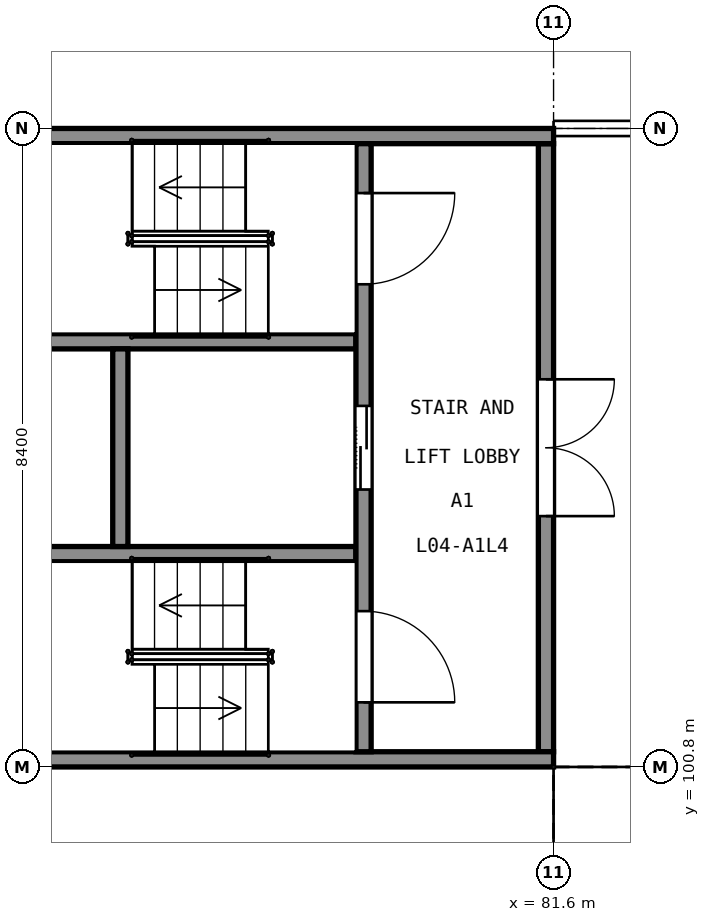
"""IFC4 building model, lengths in metres.
Left out: names, types, materials, properties, quantities, classifications, styles, units other than length and angle.
Written with IfcOpenShell. Run it as: python <this file> out.ifc"""

import sys

from ifc_helpers import new_model, si_unit, direction, frame, frame_2d, origin, place, context, subcontext, project, spatial, rectangle, extrude, element, fill, save


model = new_model("IFC4")
c1 = context("Model", 3, precision=1e-05, world=origin(), true_north=direction((0.0, 1.0)))
c2 = subcontext(c1, "Body", "Model", "MODEL_VIEW")
j1 = project(units=[si_unit("LENGTHUNIT", "METRE"), si_unit("PLANEANGLEUNIT", "RADIAN")], contexts=[c1])
p1 = place(None, origin())
s1 = spatial("IfcSite", under=j1, at=p1, CompositionType="ELEMENT")
p2 = place(p1, origin())
s2 = spatial("IfcBuilding", under=s1, at=p2, CompositionType="ELEMENT")
p3 = place(p2, frame((0.0, 0.0, 25.0)))
s3 = spatial("IfcBuildingStorey", under=s2, at=p3, CompositionType="ELEMENT", Elevation=25.0)
for number, where, z_axis, x_axis in (
    (1, (73.2, 100.9, 0.0), (0.0, 0.0, 1.0), (1.0, 0.0, 0.0)),
    (2, (73.2, 109.1, 0.0), (0.0, 0.0, 1.0), (1.0, 0.0, 0.0)),
):
    element("IfcWall", number, at=place(p3, frame(where, z_axis=z_axis, x_axis=x_axis)), inside=s3, PredefinedType="SHEAR", context=c2, shape_type="SweptSolid", body=[
        extrude(rectangle(XDim=8.4, YDim=0.2, at=frame_2d((4.2, 0.0))), origin(), (0.0, 0.0, 1.0), 5.0),
    ])
p4 = place(p3, frame((81.5, 101.0, 0.0), z_axis=(0.0, 0.0, 1.0), x_axis=(0.0, 1.0, 0.0)))
e3 = element("IfcWall", 3, at=p4, inside=s3, PredefinedType="SHEAR", context=c2, shape_type="SweptSolid", body=[
    extrude(rectangle(XDim=8.0, YDim=0.2, at=frame_2d((4.0, 0.0))), origin(), (0.0, 0.0, 1.0), 5.0),
])
p5 = place(p4, frame((3.1, 0.0, 0.0)))
e4 = element("IfcOpeningElement", 4, at=p5, cuts=e3, PredefinedType="OPENING", context=c2, shape_type="SweptSolid", body=[
    extrude(rectangle(XDim=1.8, YDim=2.1, at=frame_2d((0.9, 1.05))), frame((0.0, 0.11, 0.0), z_axis=(0.0, -1.0, 0.0), x_axis=(1.0, 0.0, 0.0)), (0.0, 0.0, 1.0), 0.22),
])
p6 = place(p3, frame((79.1, 101.0, 0.0), z_axis=(0.0, 0.0, 1.0), x_axis=(0.0, 1.0, 0.0)))
e5 = element("IfcWall", 5, at=p6, inside=s3, PredefinedType="SHEAR", context=c2, shape_type="SweptSolid", body=[
    extrude(rectangle(XDim=8.0, YDim=0.2, at=frame_2d((4.0, 0.0))), origin(), (0.0, 0.0, 1.0), 5.0),
])
p7 = place(p6, frame((0.65, 0.0, 0.0)))
e6 = element("IfcOpeningElement", 6, at=p7, cuts=e5, PredefinedType="OPENING", context=c2, shape_type="SweptSolid", body=[
    extrude(rectangle(XDim=1.2, YDim=2.1, at=frame_2d((0.6, 1.05))), frame((0.0, 0.11, 0.0), z_axis=(0.0, -1.0, 0.0), x_axis=(1.0, 0.0, 0.0)), (0.0, 0.0, 1.0), 0.22),
])
p8 = place(p6, frame((6.15, 0.0, 0.0)))
e7 = element("IfcOpeningElement", 7, at=p8, cuts=e5, PredefinedType="OPENING", context=c2, shape_type="SweptSolid", body=[
    extrude(rectangle(XDim=1.2, YDim=2.1, at=frame_2d((0.6, 1.05))), frame((0.0, 0.11, 0.0), z_axis=(0.0, -1.0, 0.0), x_axis=(1.0, 0.0, 0.0)), (0.0, 0.0, 1.0), 0.22),
])
p9 = place(p6, frame((3.45, 0.0, 0.0)))
e8 = element("IfcOpeningElement", 8, at=p9, cuts=e5, PredefinedType="OPENING", context=c2, shape_type="SweptSolid", body=[
    extrude(rectangle(XDim=1.1, YDim=2.1, at=frame_2d((0.55, 1.05))), frame((0.0, 0.11, 0.0), z_axis=(0.0, -1.0, 0.0), x_axis=(1.0, 0.0, 0.0)), (0.0, 0.0, 1.0), 0.22),
])
for number, where, z_axis, x_axis in (
    (9, (73.4, 103.6, 0.0), (0.0, 0.0, 1.0), (1.0, 0.0, 0.0)),
    (10, (73.4, 106.4, 0.0), (0.0, 0.0, 1.0), (1.0, 0.0, 0.0)),
):
    element("IfcWall", number, at=place(p3, frame(where, z_axis=z_axis, x_axis=x_axis)), inside=s3, PredefinedType="SHEAR", context=c2, shape_type="SweptSolid", body=[
        extrude(rectangle(XDim=5.6, YDim=0.2, at=frame_2d((2.8, 0.0))), origin(), (0.0, 0.0, 1.0), 5.0),
    ])
p10 = place(p3, frame((75.9, 103.7, 0.0), z_axis=(0.0, 0.0, 1.0), x_axis=(0.0, 1.0, 0.0)))
e11 = element("IfcWall", 11, at=p10, inside=s3, PredefinedType="SHEAR", context=c2, shape_type="SweptSolid", body=[
    extrude(rectangle(XDim=2.6, YDim=0.2, at=frame_2d((1.3, 0.0))), origin(), (0.0, 0.0, 1.0), 5.0),
])
p11 = place(p5, origin())
e12 = element("IfcDoor", 12, at=p11, inside=s3, OperationType="DOUBLE_DOOR_SINGLE_SWING", PredefinedType="DOOR", context=c2, shape_type="SweptSolid", body=[
    extrude(rectangle(XDim=1.8, YDim=2.1, at=frame_2d((0.9, 1.05))), frame((0.0, 0.025, 0.0), z_axis=(0.0, -1.0, 0.0), x_axis=(1.0, 0.0, 0.0)), (0.0, 0.0, 1.0), 0.05),
])
fill(e4, e12)
p12 = place(p7, origin())
e13 = element("IfcDoor", 13, at=p12, inside=s3, OperationType="SINGLE_SWING_LEFT", PredefinedType="DOOR", context=c2, shape_type="SweptSolid", body=[
    extrude(rectangle(XDim=1.2, YDim=2.1, at=frame_2d((0.6, 1.05))), frame((0.0, 0.025, 0.0), z_axis=(0.0, -1.0, 0.0), x_axis=(1.0, 0.0, 0.0)), (0.0, 0.0, 1.0), 0.05),
])
fill(e6, e13)
p13 = place(p8, origin())
e14 = element("IfcDoor", 14, at=p13, inside=s3, OperationType="SINGLE_SWING_RIGHT", PredefinedType="DOOR", context=c2, shape_type="SweptSolid", body=[
    extrude(rectangle(XDim=1.2, YDim=2.1, at=frame_2d((0.6, 1.05))), frame((0.0, 0.025, 0.0), z_axis=(0.0, -1.0, 0.0), x_axis=(1.0, 0.0, 0.0)), (0.0, 0.0, 1.0), 0.05),
])
fill(e7, e14)
p14 = place(p9, origin())
e15 = element("IfcDoor", 15, at=p14, inside=s3, OperationType="DOUBLE_DOOR_SLIDING", PredefinedType="DOOR", context=c2, shape_type="SweptSolid", body=[
    extrude(rectangle(XDim=1.1, YDim=2.1, at=frame_2d((0.55, 1.05))), frame((0.0, 0.025, 0.0), z_axis=(0.0, -1.0, 0.0), x_axis=(1.0, 0.0, 0.0)), (0.0, 0.0, 1.0), 0.05),
])
fill(e8, e15)
save(model, sys.argv[1])
